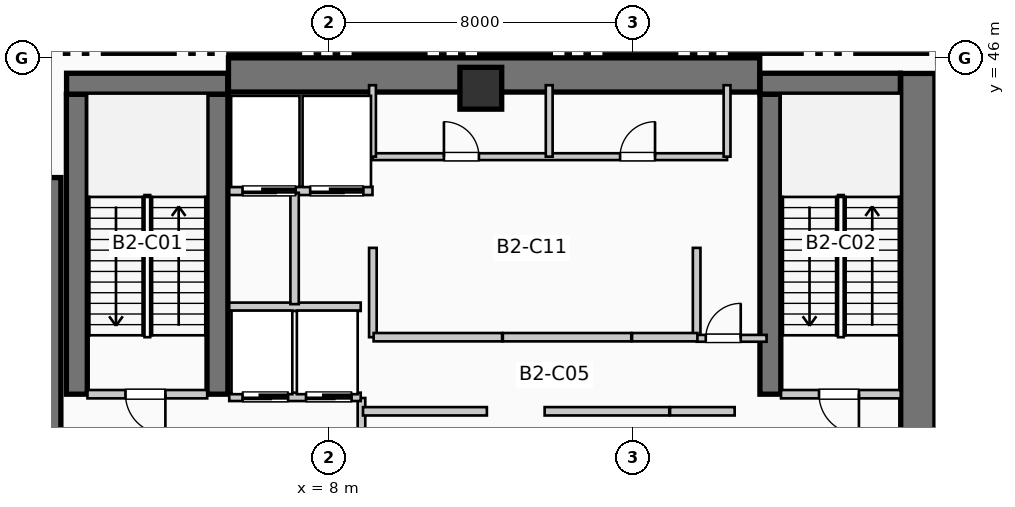
"""IFC4 building model, lengths in metres.
Left out: names, types, materials, properties, quantities, classifications, styles, units other than length and angle.
Written with IfcOpenShell. Run it as: python <this file> out.ifc"""

import sys

from ifc_helpers import new_model, si_unit, direction, frame, frame_2d, origin, origin_2d, place, context, subcontext, project, spatial, rectangle, extrude, element, fill, save


model = new_model("IFC4")
c1 = context("Model", 3, precision=1e-05, world=origin(), true_north=direction((0.0, 1.0)))
c2 = subcontext(c1, "Body", "Model", "MODEL_VIEW")
j1 = project(units=[si_unit("LENGTHUNIT", "METRE"), si_unit("PLANEANGLEUNIT", "RADIAN")], contexts=[c1])
p1 = place(None, origin())
s1 = spatial("IfcSite", under=j1, at=p1, CompositionType="ELEMENT")
p2 = place(p1, origin())
s2 = spatial("IfcBuilding", under=s1, at=p2, CompositionType="ELEMENT")
p3 = place(p2, frame((0.0, 0.0, -9.24)))
s3 = spatial("IfcBuildingStorey", under=s2, at=p3, CompositionType="ELEMENT", Elevation=-9.24)
p4 = place(p3, frame((5.36, 45.55, 0.0), z_axis=(0.0, 0.0, 1.0), x_axis=(1.0, 0.0, 0.0)))
e1 = element("IfcWall", 1, at=p4, inside=s3, PredefinedType="SHEAR", context=c2, shape_type="SweptSolid", body=[
    extrude(rectangle(XDim=13.98, YDim=0.9, at=frame_2d((6.99, 0.0))), origin(), (0.0, 0.0, 1.0), 4.62),
])
p5 = place(p3, frame((0.5, 34.95, 0.0), z_axis=(0.0, 0.0, 1.0), x_axis=(0.0, 1.0, 0.0)))
e2 = element("IfcWall", 2, at=p5, inside=s3, PredefinedType="SHEAR", context=c2, shape_type="SweptSolid", body=[
    extrude(rectangle(XDim=7.9, YDim=0.9, at=frame_2d((3.95, 0.0))), origin(), (0.0, 0.0, 1.0), 4.62),
])
p6 = place(p3, frame((23.5, 34.95, 0.0), z_axis=(0.0, 0.0, 1.0), x_axis=(0.0, 1.0, 0.0)))
e3 = element("IfcWall", 3, at=p6, inside=s3, PredefinedType="SHEAR", context=c2, shape_type="SweptSolid", body=[
    extrude(rectangle(XDim=10.64, YDim=0.9, at=frame_2d((5.32, 0.0))), origin(), (0.0, 0.0, 1.0), 4.62),
])
for number, where, z_axis, x_axis in (
    (4, (1.37, 37.15, 0.0), (0.0, 0.0, 1.0), (0.0, 1.0, 0.0)),
    (5, (5.07, 37.15, 0.0), (0.0, 0.0, 1.0), (0.0, 1.0, 0.0)),
):
    element("IfcWall", number, at=place(p3, frame(where, z_axis=z_axis, x_axis=x_axis)), inside=s3, PredefinedType="SHEAR", context=c2, shape_type="SweptSolid", body=[
        extrude(rectangle(XDim=7.89, YDim=0.55, at=frame_2d((3.945, 0.0))), origin(), (0.0, 0.0, 1.0), 4.62),
    ])
p7 = place(p3, frame((1.1, 45.32, 0.0), z_axis=(0.0, 0.0, 1.0), x_axis=(1.0, 0.0, 0.0)))
e6 = element("IfcWall", 6, at=p7, inside=s3, PredefinedType="SHEAR", context=c2, shape_type="SweptSolid", body=[
    extrude(rectangle(XDim=4.24, YDim=0.55, at=frame_2d((2.12, 0.0))), origin(), (0.0, 0.0, 1.0), 4.62),
])
p8 = place(p3, frame((19.62, 37.15, 0.0), z_axis=(0.0, 0.0, 1.0), x_axis=(0.0, 1.0, 0.0)))
e7 = element("IfcWall", 7, at=p8, inside=s3, PredefinedType="SHEAR", context=c2, shape_type="SweptSolid", body=[
    extrude(rectangle(XDim=7.89, YDim=0.55, at=frame_2d((3.945, 0.0))), origin(), (0.0, 0.0, 1.0), 4.62),
])
p9 = place(p3, frame((19.35, 45.32, 0.0), z_axis=(0.0, 0.0, 1.0), x_axis=(1.0, 0.0, 0.0)))
e8 = element("IfcWall", 8, at=p9, inside=s3, PredefinedType="SHEAR", context=c2, shape_type="SweptSolid", body=[
    extrude(rectangle(XDim=3.69, YDim=0.55, at=frame_2d((1.845, 0.0))), origin(), (0.0, 0.0, 1.0), 4.62),
])
p10 = place(p3, frame((12.0, 45.2, 0.0), z_axis=(0.0, 0.0, 1.0), x_axis=(1.0, 0.0, 0.0)))
e9 = element("IfcColumn", 9, at=p10, inside=s3, PredefinedType="COLUMN", context=c2, shape_type="SweptSolid", body=[
    extrude(rectangle(XDim=1.1, YDim=1.1, at=origin_2d()), origin(), (0.0, 0.0, 1.0), 4.62),
])
p11 = place(p3, frame((1.65, 37.15, 0.0), z_axis=(0.0, 0.0, 1.0), x_axis=(1.0, 0.0, 0.0)))
e10 = element("IfcWall", 10, at=p11, inside=s3, PredefinedType="PARTITIONING", context=c2, shape_type="SweptSolid", body=[
    extrude(rectangle(XDim=3.15, YDim=0.22, at=frame_2d((1.575, 0.0))), origin(), (0.0, 0.0, 1.0), 4.27),
])
p12 = place(p11, frame((2.05, 0.0, 0.0), z_axis=(0.0, 0.0, 1.0), x_axis=(-1.0, 0.0, 0.0)))
e11 = element("IfcOpeningElement", 11, at=p12, cuts=e10, PredefinedType="OPENING", context=c2, shape_type="SweptSolid", body=[
    extrude(rectangle(XDim=1.05, YDim=2.15, at=frame_2d((0.525, 1.075))), frame((0.0, 0.12, 0.0), z_axis=(0.0, -1.0, 0.0), x_axis=(1.0, 0.0, 0.0)), (0.0, 0.0, 1.0), 0.24),
])
p13 = place(p3, frame((8.86, 34.55, 0.0), z_axis=(0.0, 0.0, 1.0), x_axis=(0.0, 1.0, 0.0)))
e12 = element("IfcWall", 12, at=p13, inside=s3, PredefinedType="PARTITIONING", context=c2, shape_type="SweptSolid", body=[
    extrude(rectangle(XDim=2.5, YDim=0.2, at=frame_2d((1.25, 0.0))), origin(), (0.0, 0.0, 1.0), 4.27),
])
p14 = place(p3, frame((19.9, 37.15, 0.0), z_axis=(0.0, 0.0, 1.0), x_axis=(1.0, 0.0, 0.0)))
e13 = element("IfcWall", 13, at=p14, inside=s3, PredefinedType="PARTITIONING", context=c2, shape_type="SweptSolid", body=[
    extrude(rectangle(XDim=3.15, YDim=0.22, at=frame_2d((1.575, 0.0))), origin(), (0.0, 0.0, 1.0), 4.27),
])
p15 = place(p14, frame((2.05, 0.0, 0.0), z_axis=(0.0, 0.0, 1.0), x_axis=(-1.0, 0.0, 0.0)))
e14 = element("IfcOpeningElement", 14, at=p15, cuts=e13, PredefinedType="OPENING", context=c2, shape_type="SweptSolid", body=[
    extrude(rectangle(XDim=1.05, YDim=2.15, at=frame_2d((0.525, 1.075))), frame((0.0, 0.12, 0.0), z_axis=(0.0, -1.0, 0.0), x_axis=(1.0, 0.0, 0.0)), (0.0, 0.0, 1.0), 0.24),
])
p16 = place(p3, frame((5.38, 37.08, 0.0), z_axis=(0.0, 0.0, 1.0), x_axis=(1.0, 0.0, 0.0)))
e15 = element("IfcWall", 15, at=p16, inside=s3, PredefinedType="PARTITIONING", context=c2, shape_type="SweptSolid", body=[
    extrude(rectangle(XDim=3.46, YDim=0.22, at=frame_2d((1.73, 0.0))), origin(), (0.0, 0.0, 1.0), 4.27),
])
p17 = place(p16, frame((1.55, 0.0, 0.0), z_axis=(0.0, 0.0, 1.0), x_axis=(-1.0, 0.0, 0.0)))
e16 = element("IfcOpeningElement", 16, at=p17, cuts=e15, PredefinedType="OPENING", context=c2, shape_type="SweptSolid", body=[
    extrude(rectangle(XDim=1.2, YDim=2.2, at=frame_2d((0.6, 1.1))), frame((0.0, 0.12, 0.0), z_axis=(0.0, -1.0, 0.0), x_axis=(1.0, 0.0, 0.0)), (0.0, 0.0, 1.0), 0.24),
])
p18 = place(p16, frame((3.22, 0.0, 0.0), z_axis=(0.0, 0.0, 1.0), x_axis=(-1.0, 0.0, 0.0)))
e17 = element("IfcOpeningElement", 17, at=p18, cuts=e15, PredefinedType="OPENING", context=c2, shape_type="SweptSolid", body=[
    extrude(rectangle(XDim=1.2, YDim=2.2, at=frame_2d((0.6, 1.1))), frame((0.0, 0.12, 0.0), z_axis=(0.0, -1.0, 0.0), x_axis=(1.0, 0.0, 0.0)), (0.0, 0.0, 1.0), 0.24),
])
p19 = place(p3, frame((5.38, 39.45, 0.0), z_axis=(0.0, 0.0, 1.0), x_axis=(1.0, 0.0, 0.0)))
e18 = element("IfcWall", 18, at=p19, inside=s3, PredefinedType="PARTITIONING", context=c2, shape_type="SweptSolid", body=[
    extrude(rectangle(XDim=3.46, YDim=0.22, at=frame_2d((1.73, 0.0))), origin(), (0.0, 0.0, 1.0), 4.27),
])
p20 = place(p3, frame((5.38, 42.5, 0.0), z_axis=(0.0, 0.0, 1.0), x_axis=(1.0, 0.0, 0.0)))
e19 = element("IfcWall", 19, at=p20, inside=s3, PredefinedType="PARTITIONING", context=c2, shape_type="SweptSolid", body=[
    extrude(rectangle(XDim=3.77, YDim=0.22, at=frame_2d((1.885, 0.0))), origin(), (0.0, 0.0, 1.0), 4.27),
])
p21 = place(p20, frame((1.75, 0.0, 0.0), z_axis=(0.0, 0.0, 1.0), x_axis=(-1.0, 0.0, 0.0)))
e20 = element("IfcOpeningElement", 20, at=p21, cuts=e19, PredefinedType="OPENING", context=c2, shape_type="SweptSolid", body=[
    extrude(rectangle(XDim=1.4, YDim=2.2, at=frame_2d((0.7, 1.1))), frame((0.0, 0.12, 0.0), z_axis=(0.0, -1.0, 0.0), x_axis=(1.0, 0.0, 0.0)), (0.0, 0.0, 1.0), 0.24),
])
p22 = place(p20, frame((3.53, 0.0, 0.0), z_axis=(0.0, 0.0, 1.0), x_axis=(-1.0, 0.0, 0.0)))
e21 = element("IfcOpeningElement", 21, at=p22, cuts=e19, PredefinedType="OPENING", context=c2, shape_type="SweptSolid", body=[
    extrude(rectangle(XDim=1.4, YDim=2.2, at=frame_2d((0.7, 1.1))), frame((0.0, 0.12, 0.0), z_axis=(0.0, -1.0, 0.0), x_axis=(1.0, 0.0, 0.0)), (0.0, 0.0, 1.0), 0.24),
])
p23 = place(p3, frame((7.1, 39.52, 0.0), z_axis=(0.0, 0.0, 1.0), x_axis=(0.0, 1.0, 0.0)))
e22 = element("IfcWall", 22, at=p23, inside=s3, PredefinedType="PARTITIONING", context=c2, shape_type="SweptSolid", body=[
    extrude(rectangle(XDim=2.93, YDim=0.22, at=frame_2d((1.465, 0.0))), origin(), (0.0, 0.0, 1.0), 4.27),
])
for number, where, z_axis, x_axis in (
    (23, (9.16, 38.65, 0.0), (0.0, 0.0, 1.0), (0.0, 1.0, 0.0)),
    (24, (17.68, 38.65, 0.0), (0.0, 0.0, 1.0), (0.0, 1.0, 0.0)),
):
    element("IfcWall", number, at=place(p3, frame(where, z_axis=z_axis, x_axis=x_axis)), inside=s3, PredefinedType="PARTITIONING", context=c2, shape_type="SweptSolid", body=[
        extrude(rectangle(XDim=2.35, YDim=0.2, at=frame_2d((1.175, 0.0))), origin(), (0.0, 0.0, 1.0), 4.27),
    ])
p24 = place(p3, frame((17.68, 38.62, 0.0), z_axis=(0.0, 0.0, 1.0), x_axis=(1.0, 0.0, 0.0)))
e25 = element("IfcWall", 25, at=p24, inside=s3, PredefinedType="PARTITIONING", context=c2, shape_type="SweptSolid", body=[
    extrude(rectangle(XDim=1.84, YDim=0.18, at=frame_2d((0.92, 0.0))), origin(), (0.0, 0.0, 1.0), 4.27),
])
p25 = place(p24, frame((0.24, 0.0, 0.0)))
e26 = element("IfcOpeningElement", 26, at=p25, cuts=e25, PredefinedType="OPENING", context=c2, shape_type="SweptSolid", body=[
    extrude(rectangle(XDim=0.92, YDim=2.1, at=frame_2d((0.46, 1.05))), frame((0.0, 0.1, 0.0), z_axis=(0.0, -1.0, 0.0), x_axis=(1.0, 0.0, 0.0)), (0.0, 0.0, 1.0), 0.2),
])
p26 = place(p3, frame((8.9, 36.7, 0.0), z_axis=(0.0, 0.0, 1.0), x_axis=(1.0, 0.0, 0.0)))
e27 = element("IfcWall", 27, at=p26, inside=s3, PredefinedType="PARTITIONING", context=c2, shape_type="SweptSolid", body=[
    extrude(rectangle(XDim=3.26, YDim=0.22, at=frame_2d((1.63, 0.0))), origin(), (0.0, 0.0, 1.0), 4.27),
])
p27 = place(p3, frame((9.18, 38.65, 0.0), z_axis=(0.0, 0.0, 1.0), x_axis=(1.0, 0.0, 0.0)))
e28 = element("IfcWall", 28, at=p27, inside=s3, PredefinedType="PARTITIONING", context=c2, shape_type="SweptSolid", body=[
    extrude(rectangle(XDim=3.38, YDim=0.22, at=frame_2d((1.69, 0.0))), origin(), (0.0, 0.0, 1.0), 4.27),
])
p28 = place(p3, frame((13.68, 36.7, 0.0), z_axis=(0.0, 0.0, 1.0), x_axis=(1.0, 0.0, 0.0)))
e29 = element("IfcWall", 29, at=p28, inside=s3, PredefinedType="PARTITIONING", context=c2, shape_type="SweptSolid", body=[
    extrude(rectangle(XDim=3.28, YDim=0.22, at=frame_2d((1.64, 0.0))), origin(), (0.0, 0.0, 1.0), 4.27),
])
p29 = place(p3, frame((12.58, 38.65, 0.0), z_axis=(0.0, 0.0, 1.0), x_axis=(1.0, 0.0, 0.0)))
e30 = element("IfcWall", 30, at=p29, inside=s3, PredefinedType="PARTITIONING", context=c2, shape_type="SweptSolid", body=[
    extrude(rectangle(XDim=3.38, YDim=0.22, at=frame_2d((1.69, 0.0))), origin(), (0.0, 0.0, 1.0), 4.27),
])
p30 = place(p3, frame((16.98, 36.7, 0.0), z_axis=(0.0, 0.0, 1.0), x_axis=(1.0, 0.0, 0.0)))
e31 = element("IfcWall", 31, at=p30, inside=s3, PredefinedType="PARTITIONING", context=c2, shape_type="SweptSolid", body=[
    extrude(rectangle(XDim=1.7, YDim=0.22, at=frame_2d((0.85, 0.0))), origin(), (0.0, 0.0, 1.0), 4.27),
])
p31 = place(p3, frame((15.98, 38.65, 0.0), z_axis=(0.0, 0.0, 1.0), x_axis=(1.0, 0.0, 0.0)))
e32 = element("IfcWall", 32, at=p31, inside=s3, PredefinedType="PARTITIONING", context=c2, shape_type="SweptSolid", body=[
    extrude(rectangle(XDim=1.72, YDim=0.22, at=frame_2d((0.86, 0.0))), origin(), (0.0, 0.0, 1.0), 4.27),
])
p32 = place(p3, frame((9.15, 43.4, 0.0), z_axis=(0.0, 0.0, 1.0), x_axis=(1.0, 0.0, 0.0)))
e33 = element("IfcWall", 33, at=p32, inside=s3, PredefinedType="PLUMBINGWALL", context=c2, shape_type="SweptSolid", body=[
    extrude(rectangle(XDim=9.33, YDim=0.18, at=frame_2d((4.665, 0.0))), origin(), (0.0, 0.0, 1.0), 4.27),
])
p33 = place(p32, frame((1.88, 0.0, 0.0)))
e34 = element("IfcOpeningElement", 34, at=p33, cuts=e33, PredefinedType="OPENING", context=c2, shape_type="SweptSolid", body=[
    extrude(rectangle(XDim=0.92, YDim=2.1, at=frame_2d((0.46, 1.05))), frame((0.0, 0.1, 0.0), z_axis=(0.0, -1.0, 0.0), x_axis=(1.0, 0.0, 0.0)), (0.0, 0.0, 1.0), 0.2),
])
p34 = place(p32, frame((6.515, 0.0, 0.0)))
e35 = element("IfcOpeningElement", 35, at=p34, cuts=e33, PredefinedType="OPENING", context=c2, shape_type="SweptSolid", body=[
    extrude(rectangle(XDim=0.92, YDim=2.1, at=frame_2d((0.46, 1.05))), frame((0.0, 0.1, 0.0), z_axis=(0.0, -1.0, 0.0), x_axis=(1.0, 0.0, 0.0)), (0.0, 0.0, 1.0), 0.2),
])
for number, where, z_axis, x_axis in (
    (36, (9.15, 43.4, 0.0), (0.0, 0.0, 1.0), (0.0, 1.0, 0.0)),
    (37, (18.48, 43.4, 0.0), (0.0, 0.0, 1.0), (0.0, 1.0, 0.0)),
    (38, (13.8, 43.4, 0.0), (0.0, 0.0, 1.0), (0.0, 1.0, 0.0)),
):
    element("IfcWall", number, at=place(p3, frame(where, z_axis=z_axis, x_axis=x_axis)), inside=s3, PredefinedType="PLUMBINGWALL", context=c2, shape_type="SweptSolid", body=[
        extrude(rectangle(XDim=1.88, YDim=0.18, at=frame_2d((0.94, 0.0))), origin(), (0.0, 0.0, 1.0), 4.27),
    ])
p35 = place(p12, origin())
e39 = element("IfcDoor", 39, at=p35, inside=s3, OperationType="SINGLE_SWING_RIGHT", PredefinedType="DOOR", context=c2, shape_type="SweptSolid", body=[
    extrude(rectangle(XDim=1.05, YDim=2.15, at=frame_2d((0.525, 1.075))), frame((0.0, 0.025, 0.0), z_axis=(0.0, -1.0, 0.0), x_axis=(1.0, 0.0, 0.0)), (0.0, 0.0, 1.0), 0.05),
])
fill(e11, e39)
p36 = place(p15, origin())
e40 = element("IfcDoor", 40, at=p36, inside=s3, OperationType="SINGLE_SWING_RIGHT", PredefinedType="DOOR", context=c2, shape_type="SweptSolid", body=[
    extrude(rectangle(XDim=1.05, YDim=2.15, at=frame_2d((0.525, 1.075))), frame((0.0, 0.025, 0.0), z_axis=(0.0, -1.0, 0.0), x_axis=(1.0, 0.0, 0.0)), (0.0, 0.0, 1.0), 0.05),
])
fill(e14, e40)
p37 = place(p17, origin())
e41 = element("IfcDoor", 41, at=p37, inside=s3, OperationType="SLIDING_TO_RIGHT", PredefinedType="DOOR", context=c2, shape_type="SweptSolid", body=[
    extrude(rectangle(XDim=1.2, YDim=2.2, at=frame_2d((0.6, 1.1))), frame((0.0, 0.025, 0.0), z_axis=(0.0, -1.0, 0.0), x_axis=(1.0, 0.0, 0.0)), (0.0, 0.0, 1.0), 0.05),
])
fill(e16, e41)
p38 = place(p18, origin())
e42 = element("IfcDoor", 42, at=p38, inside=s3, OperationType="SLIDING_TO_RIGHT", PredefinedType="DOOR", context=c2, shape_type="SweptSolid", body=[
    extrude(rectangle(XDim=1.2, YDim=2.2, at=frame_2d((0.6, 1.1))), frame((0.0, 0.025, 0.0), z_axis=(0.0, -1.0, 0.0), x_axis=(1.0, 0.0, 0.0)), (0.0, 0.0, 1.0), 0.05),
])
fill(e17, e42)
p39 = place(p21, origin())
e43 = element("IfcDoor", 43, at=p39, inside=s3, OperationType="SLIDING_TO_LEFT", PredefinedType="DOOR", context=c2, shape_type="SweptSolid", body=[
    extrude(rectangle(XDim=1.4, YDim=2.2, at=frame_2d((0.7, 1.1))), frame((0.0, 0.025, 0.0), z_axis=(0.0, -1.0, 0.0), x_axis=(1.0, 0.0, 0.0)), (0.0, 0.0, 1.0), 0.05),
])
fill(e20, e43)
p40 = place(p22, origin())
e44 = element("IfcDoor", 44, at=p40, inside=s3, OperationType="SLIDING_TO_LEFT", PredefinedType="DOOR", context=c2, shape_type="SweptSolid", body=[
    extrude(rectangle(XDim=1.4, YDim=2.2, at=frame_2d((0.7, 1.1))), frame((0.0, 0.025, 0.0), z_axis=(0.0, -1.0, 0.0), x_axis=(1.0, 0.0, 0.0)), (0.0, 0.0, 1.0), 0.05),
])
fill(e21, e44)
p41 = place(p25, origin())
e45 = element("IfcDoor", 45, at=p41, inside=s3, OperationType="SINGLE_SWING_RIGHT", PredefinedType="DOOR", context=c2, shape_type="SweptSolid", body=[
    extrude(rectangle(XDim=0.92, YDim=2.1, at=frame_2d((0.46, 1.05))), frame((0.0, 0.025, 0.0), z_axis=(0.0, -1.0, 0.0), x_axis=(1.0, 0.0, 0.0)), (0.0, 0.0, 1.0), 0.05),
])
fill(e26, e45)
p42 = place(p33, origin())
e46 = element("IfcDoor", 46, at=p42, inside=s3, OperationType="SINGLE_SWING_LEFT", PredefinedType="DOOR", context=c2, shape_type="SweptSolid", body=[
    extrude(rectangle(XDim=0.92, YDim=2.1, at=frame_2d((0.46, 1.05))), frame((0.0, 0.025, 0.0), z_axis=(0.0, -1.0, 0.0), x_axis=(1.0, 0.0, 0.0)), (0.0, 0.0, 1.0), 0.05),
])
fill(e34, e46)
p43 = place(p34, origin())
e47 = element("IfcDoor", 47, at=p43, inside=s3, OperationType="SINGLE_SWING_RIGHT", PredefinedType="DOOR", context=c2, shape_type="SweptSolid", body=[
    extrude(rectangle(XDim=0.92, YDim=2.1, at=frame_2d((0.46, 1.05))), frame((0.0, 0.025, 0.0), z_axis=(0.0, -1.0, 0.0), x_axis=(1.0, 0.0, 0.0)), (0.0, 0.0, 1.0), 0.05),
])
fill(e35, e47)
save(model, sys.argv[1])
